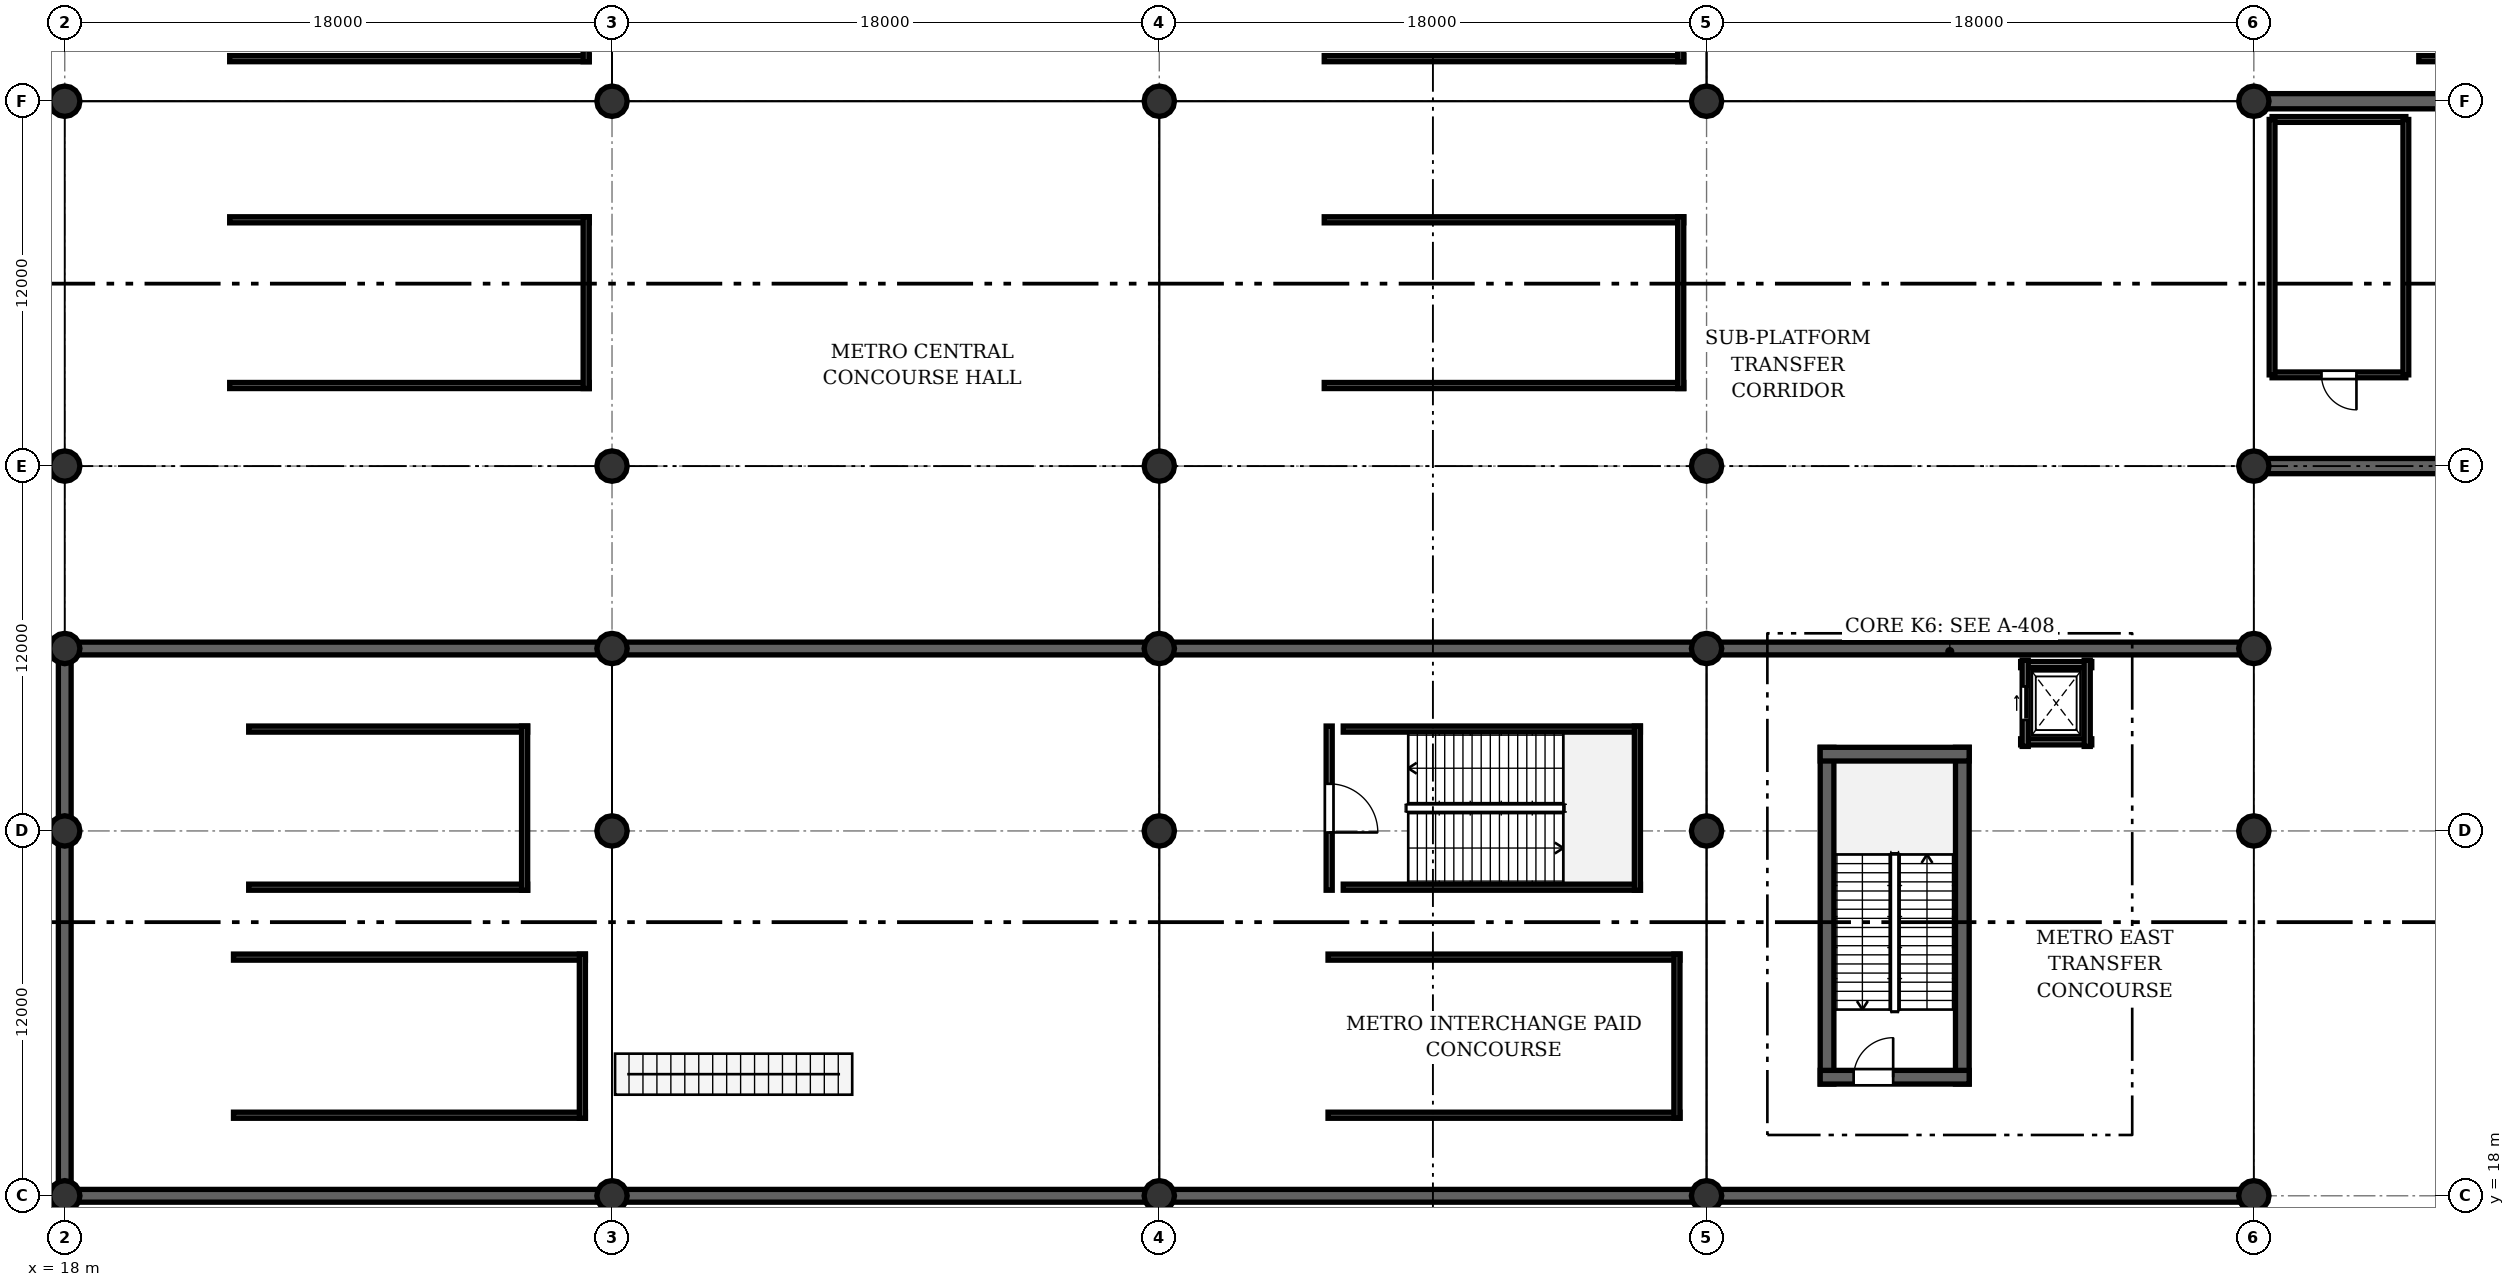
"""IFC4 building model, lengths in metres.
Left out: names, types, materials, properties, quantities, classifications, styles, units other than length and angle.
Written with IfcOpenShell. Run it as: python <this file> out.ifc"""

import sys

from ifc_helpers import new_model, si_unit, direction, frame, frame_2d, origin, origin_2d, place, context, subcontext, project, spatial, rectangle, circle, extrude, element, fill, save


model = new_model("IFC4")
c1 = context("Model", 3, precision=1e-05, world=origin(), true_north=direction((0.0, 1.0)))
c2 = subcontext(c1, "Body", "Model", "MODEL_VIEW")
j1 = project(units=[si_unit("LENGTHUNIT", "METRE"), si_unit("PLANEANGLEUNIT", "RADIAN")], contexts=[c1])
p1 = place(None, origin())
s1 = spatial("IfcSite", under=j1, at=p1, CompositionType="ELEMENT")
p2 = place(p1, origin())
s2 = spatial("IfcBuilding", under=s1, at=p2, CompositionType="ELEMENT")
p3 = place(p2, frame((0.0, 0.0, -5.4)))
s3 = spatial("IfcBuildingStorey", under=s2, at=p3, CompositionType="ELEMENT", Elevation=-5.4)
for number, where, z_axis, x_axis in (
    (1, (18.0, 18.0, 0.0), (0.0, 0.0, 1.0), (1.0, 0.0, 0.0)),
    (2, (18.0, 30.0, 0.0), (0.0, 0.0, 1.0), (1.0, 0.0, 0.0)),
    (3, (18.0, 36.0, 0.0), (0.0, 0.0, 1.0), (1.0, 0.0, 0.0)),
    (4, (18.0, 42.0, 0.0), (0.0, 0.0, 1.0), (1.0, 0.0, 0.0)),
    (5, (18.0, 54.0, 0.0), (0.0, 0.0, 1.0), (1.0, 0.0, 0.0)),
    (6, (36.0, 18.0, 0.0), (0.0, 0.0, 1.0), (1.0, 0.0, 0.0)),
    (7, (36.0, 30.0, 0.0), (0.0, 0.0, 1.0), (1.0, 0.0, 0.0)),
    (8, (36.0, 36.0, 0.0), (0.0, 0.0, 1.0), (1.0, 0.0, 0.0)),
    (9, (36.0, 42.0, 0.0), (0.0, 0.0, 1.0), (1.0, 0.0, 0.0)),
    (10, (36.0, 54.0, 0.0), (0.0, 0.0, 1.0), (1.0, 0.0, 0.0)),
    (11, (54.0, 18.0, 0.0), (0.0, 0.0, 1.0), (1.0, 0.0, 0.0)),
    (12, (54.0, 30.0, 0.0), (0.0, 0.0, 1.0), (1.0, 0.0, 0.0)),
    (13, (54.0, 36.0, 0.0), (0.0, 0.0, 1.0), (1.0, 0.0, 0.0)),
    (14, (54.0, 42.0, 0.0), (0.0, 0.0, 1.0), (1.0, 0.0, 0.0)),
    (15, (54.0, 54.0, 0.0), (0.0, 0.0, 1.0), (1.0, 0.0, 0.0)),
    (16, (72.0, 18.0, 0.0), (0.0, 0.0, 1.0), (1.0, 0.0, 0.0)),
    (17, (72.0, 30.0, 0.0), (0.0, 0.0, 1.0), (1.0, 0.0, 0.0)),
    (18, (72.0, 36.0, 0.0), (0.0, 0.0, 1.0), (1.0, 0.0, 0.0)),
    (19, (72.0, 42.0, 0.0), (0.0, 0.0, 1.0), (1.0, 0.0, 0.0)),
    (20, (72.0, 54.0, 0.0), (0.0, 0.0, 1.0), (1.0, 0.0, 0.0)),
    (21, (90.0, 18.0, 0.0), (0.0, 0.0, 1.0), (1.0, 0.0, 0.0)),
    (22, (90.0, 30.0, 0.0), (0.0, 0.0, 1.0), (1.0, 0.0, 0.0)),
    (23, (90.0, 36.0, 0.0), (0.0, 0.0, 1.0), (1.0, 0.0, 0.0)),
    (24, (90.0, 42.0, 0.0), (0.0, 0.0, 1.0), (1.0, 0.0, 0.0)),
    (25, (90.0, 54.0, 0.0), (0.0, 0.0, 1.0), (1.0, 0.0, 0.0)),
):
    element("IfcColumn", number, at=place(p3, frame(where, z_axis=z_axis, x_axis=x_axis)), inside=s3, PredefinedType="COLUMN", context=c2, shape_type="SweptSolid", body=[
        extrude(circle(Radius=0.5, at=origin_2d()), origin(), (0.0, 0.0, 1.0), 5.4),
    ])
for number, where, z_axis, x_axis in (
    (26, (90.0, 54.0, 0.0), (0.0, 0.0, 1.0), (1.0, 0.0, 0.0)),
    (27, (136.0, 42.0, 0.0), (0.0, 0.0, 1.0), (-1.0, 0.0, 0.0)),
):
    element("IfcWall", number, at=place(p3, frame(where, z_axis=z_axis, x_axis=x_axis)), inside=s3, PredefinedType="USERDEFINED", context=c2, shape_type="SweptSolid", body=[
        extrude(rectangle(XDim=46.0, YDim=0.5, at=frame_2d((23.0, 0.0))), origin(), (0.0, 0.0, 1.0), 5.05),
    ])
for number, where, z_axis, x_axis in (
    (28, (18.0, 18.0, 0.0), (0.0, 0.0, 1.0), (1.0, 0.0, 0.0)),
    (29, (90.0, 36.0, 0.0), (0.0, 0.0, 1.0), (-1.0, 0.0, 0.0)),
):
    element("IfcWall", number, at=place(p3, frame(where, z_axis=z_axis, x_axis=x_axis)), inside=s3, PredefinedType="USERDEFINED", context=c2, shape_type="SweptSolid", body=[
        extrude(rectangle(XDim=72.0, YDim=0.42, at=frame_2d((36.0, 0.0))), origin(), (0.0, 0.0, 1.0), 5.05),
    ])
p4 = place(p3, frame((18.0, 36.0, 0.0), z_axis=(0.0, 0.0, 1.0), x_axis=(0.0, -1.0, 0.0)))
e30 = element("IfcWall", 30, at=p4, inside=s3, PredefinedType="USERDEFINED", context=c2, shape_type="SweptSolid", body=[
    extrude(rectangle(XDim=18.0, YDim=0.42, at=frame_2d((9.0, 0.0))), origin(), (0.0, 0.0, 1.0), 5.05),
])
for number, where, z_axis, x_axis in (
    (31, (80.413, 21.675, 0.0), (0.0, 0.0, 1.0), (0.0, 1.0, 0.0)),
    (32, (75.962, 32.75, 0.0), (0.0, 0.0, 1.0), (0.0, -1.0, 0.0)),
):
    element("IfcWall", number, at=place(p3, frame(where, z_axis=z_axis, x_axis=x_axis)), inside=s3, PredefinedType="SHEAR", context=c2, shape_type="SweptSolid", body=[
        extrude(rectangle(XDim=11.075, YDim=0.45, at=frame_2d((5.538, 0.0))), origin(), (0.0, 0.0, 1.0), 5.05),
    ])
p5 = place(p3, frame((80.637, 32.525, 0.0), z_axis=(0.0, 0.0, 1.0), x_axis=(-1.0, 0.0, 0.0)))
e33 = element("IfcWall", 33, at=p5, inside=s3, PredefinedType="SHEAR", context=c2, shape_type="SweptSolid", body=[
    extrude(rectangle(XDim=4.9, YDim=0.45, at=frame_2d((2.45, 0.0))), origin(), (0.0, 0.0, 1.0), 5.05),
])
p6 = place(p3, frame((75.738, 21.9, 0.0), z_axis=(0.0, 0.0, 1.0), x_axis=(1.0, 0.0, 0.0)))
e34 = element("IfcWall", 34, at=p6, inside=s3, PredefinedType="SHEAR", context=c2, shape_type="SweptSolid", body=[
    extrude(rectangle(XDim=4.9, YDim=0.45, at=frame_2d((2.45, 0.0))), origin(), (0.0, 0.0, 1.0), 5.05),
])
p7 = place(p6, frame((1.1, 0.0, 0.0)))
e35 = element("IfcOpeningElement", 35, at=p7, cuts=e34, PredefinedType="OPENING", context=c2, shape_type="SweptSolid", body=[
    extrude(rectangle(XDim=1.3, YDim=2.1, at=frame_2d((0.65, 1.05))), frame((0.0, 0.235, 0.0), z_axis=(0.0, -1.0, 0.0), x_axis=(1.0, 0.0, 0.0)), (0.0, 0.0, 1.0), 0.47),
])
p8 = place(p3, frame((23.425, 55.4, 0.0), z_axis=(0.0, 0.0, 1.0), x_axis=(1.0, 0.0, 0.0)))
e36 = element("IfcWall", 36, at=p8, inside=s3, PredefinedType="SOLIDWALL", context=c2, shape_type="SweptSolid", body=[
    extrude(rectangle(XDim=11.825, YDim=0.2, at=frame_2d((5.913, 0.0))), origin(), (0.0, 0.0, 1.0), 5.02),
])
p9 = place(p3, frame((35.15, 55.3, 0.0), z_axis=(0.0, 0.0, 1.0), x_axis=(0.0, 1.0, 0.0)))
e37 = element("IfcWall", 37, at=p9, inside=s3, PredefinedType="SOLIDWALL", context=c2, shape_type="SweptSolid", body=[
    extrude(rectangle(XDim=5.65, YDim=0.2, at=frame_2d((2.825, 0.0))), origin(), (0.0, 0.0, 1.0), 5.02),
])
p10 = place(p3, frame((59.425, 55.4, 0.0), z_axis=(0.0, 0.0, 1.0), x_axis=(1.0, 0.0, 0.0)))
e38 = element("IfcWall", 38, at=p10, inside=s3, PredefinedType="SOLIDWALL", context=c2, shape_type="SweptSolid", body=[
    extrude(rectangle(XDim=11.825, YDim=0.2, at=frame_2d((5.913, 0.0))), origin(), (0.0, 0.0, 1.0), 5.02),
])
p11 = place(p3, frame((71.15, 55.3, 0.0), z_axis=(0.0, 0.0, 1.0), x_axis=(0.0, 1.0, 0.0)))
e39 = element("IfcWall", 39, at=p11, inside=s3, PredefinedType="SOLIDWALL", context=c2, shape_type="SweptSolid", body=[
    extrude(rectangle(XDim=5.65, YDim=0.2, at=frame_2d((2.825, 0.0))), origin(), (0.0, 0.0, 1.0), 5.02),
])
p12 = place(p3, frame((95.425, 55.4, 0.0), z_axis=(0.0, 0.0, 1.0), x_axis=(1.0, 0.0, 0.0)))
e40 = element("IfcWall", 40, at=p12, inside=s3, PredefinedType="SOLIDWALL", context=c2, shape_type="SweptSolid", body=[
    extrude(rectangle(XDim=11.825, YDim=0.2, at=frame_2d((5.913, 0.0))), origin(), (0.0, 0.0, 1.0), 5.02),
])
for number, where, z_axis, x_axis in (
    (41, (23.55, 20.65, 0.0), (0.0, 0.0, 1.0), (1.0, 0.0, 0.0)),
    (42, (35.125, 25.85, 0.0), (0.0, 0.0, 1.0), (-1.0, 0.0, 0.0)),
):
    element("IfcWall", number, at=place(p3, frame(where, z_axis=z_axis, x_axis=x_axis)), inside=s3, PredefinedType="SOLIDWALL", context=c2, shape_type="SweptSolid", body=[
        extrude(rectangle(XDim=11.575, YDim=0.2, at=frame_2d((5.788, 0.0))), origin(), (0.0, 0.0, 1.0), 5.05),
    ])
p13 = place(p3, frame((35.025, 20.55, 0.0), z_axis=(0.0, 0.0, 1.0), x_axis=(0.0, 1.0, 0.0)))
e43 = element("IfcWall", 43, at=p13, inside=s3, PredefinedType="SOLIDWALL", context=c2, shape_type="SweptSolid", body=[
    extrude(rectangle(XDim=5.4, YDim=0.2, at=frame_2d((2.7, 0.0))), origin(), (0.0, 0.0, 1.0), 5.05),
])
for number, where, z_axis, x_axis in (
    (44, (59.55, 20.65, 0.0), (0.0, 0.0, 1.0), (1.0, 0.0, 0.0)),
    (45, (71.125, 25.85, 0.0), (0.0, 0.0, 1.0), (-1.0, 0.0, 0.0)),
):
    element("IfcWall", number, at=place(p3, frame(where, z_axis=z_axis, x_axis=x_axis)), inside=s3, PredefinedType="SOLIDWALL", context=c2, shape_type="SweptSolid", body=[
        extrude(rectangle(XDim=11.575, YDim=0.2, at=frame_2d((5.788, 0.0))), origin(), (0.0, 0.0, 1.0), 5.05),
    ])
p14 = place(p3, frame((71.025, 20.55, 0.0), z_axis=(0.0, 0.0, 1.0), x_axis=(0.0, 1.0, 0.0)))
e46 = element("IfcWall", 46, at=p14, inside=s3, PredefinedType="SOLIDWALL", context=c2, shape_type="SweptSolid", body=[
    extrude(rectangle(XDim=5.4, YDim=0.2, at=frame_2d((2.7, 0.0))), origin(), (0.0, 0.0, 1.0), 5.05),
])
for number, where, z_axis, x_axis in (
    (47, (23.425, 44.65, 0.0), (0.0, 0.0, 1.0), (1.0, 0.0, 0.0)),
    (48, (35.25, 50.1, 0.0), (0.0, 0.0, 1.0), (-1.0, 0.0, 0.0)),
):
    element("IfcWall", number, at=place(p3, frame(where, z_axis=z_axis, x_axis=x_axis)), inside=s3, PredefinedType="SOLIDWALL", context=c2, shape_type="SweptSolid", body=[
        extrude(rectangle(XDim=11.825, YDim=0.2, at=frame_2d((5.913, 0.0))), origin(), (0.0, 0.0, 1.0), 5.05),
    ])
p15 = place(p3, frame((35.15, 44.55, 0.0), z_axis=(0.0, 0.0, 1.0), x_axis=(0.0, 1.0, 0.0)))
e49 = element("IfcWall", 49, at=p15, inside=s3, PredefinedType="SOLIDWALL", context=c2, shape_type="SweptSolid", body=[
    extrude(rectangle(XDim=5.65, YDim=0.2, at=frame_2d((2.825, 0.0))), origin(), (0.0, 0.0, 1.0), 5.05),
])
for number, where, z_axis, x_axis in (
    (50, (59.425, 44.65, 0.0), (0.0, 0.0, 1.0), (1.0, 0.0, 0.0)),
    (51, (71.25, 50.1, 0.0), (0.0, 0.0, 1.0), (-1.0, 0.0, 0.0)),
):
    element("IfcWall", number, at=place(p3, frame(where, z_axis=z_axis, x_axis=x_axis)), inside=s3, PredefinedType="SOLIDWALL", context=c2, shape_type="SweptSolid", body=[
        extrude(rectangle(XDim=11.825, YDim=0.2, at=frame_2d((5.913, 0.0))), origin(), (0.0, 0.0, 1.0), 5.05),
    ])
p16 = place(p3, frame((71.15, 44.55, 0.0), z_axis=(0.0, 0.0, 1.0), x_axis=(0.0, 1.0, 0.0)))
e52 = element("IfcWall", 52, at=p16, inside=s3, PredefinedType="SOLIDWALL", context=c2, shape_type="SweptSolid", body=[
    extrude(rectangle(XDim=5.65, YDim=0.2, at=frame_2d((2.825, 0.0))), origin(), (0.0, 0.0, 1.0), 5.05),
])
for number, where, z_axis, x_axis in (
    (53, (24.05, 28.15, 0.0), (0.0, 0.0, 1.0), (1.0, 0.0, 0.0)),
    (54, (33.225, 33.35, 0.0), (0.0, 0.0, 1.0), (-1.0, 0.0, 0.0)),
):
    element("IfcWall", number, at=place(p3, frame(where, z_axis=z_axis, x_axis=x_axis)), inside=s3, PredefinedType="SOLIDWALL", context=c2, shape_type="SweptSolid", body=[
        extrude(rectangle(XDim=9.175, YDim=0.2, at=frame_2d((4.587, 0.0))), origin(), (0.0, 0.0, 1.0), 5.05),
    ])
p17 = place(p3, frame((33.125, 28.05, 0.0), z_axis=(0.0, 0.0, 1.0), x_axis=(0.0, 1.0, 0.0)))
e55 = element("IfcWall", 55, at=p17, inside=s3, PredefinedType="SOLIDWALL", context=c2, shape_type="SweptSolid", body=[
    extrude(rectangle(XDim=5.4, YDim=0.2, at=frame_2d((2.7, 0.0))), origin(), (0.0, 0.0, 1.0), 5.05),
])
for number, where, z_axis, x_axis in (
    (56, (60.05, 28.15, 0.0), (0.0, 0.0, 1.0), (1.0, 0.0, 0.0)),
    (57, (69.825, 33.35, 0.0), (0.0, 0.0, 1.0), (-1.0, 0.0, 0.0)),
):
    element("IfcWall", number, at=place(p3, frame(where, z_axis=z_axis, x_axis=x_axis)), inside=s3, PredefinedType="SOLIDWALL", context=c2, shape_type="SweptSolid", body=[
        extrude(rectangle(XDim=9.775, YDim=0.2, at=frame_2d((4.887, 0.0))), origin(), (0.0, 0.0, 1.0), 5.05),
    ])
p18 = place(p3, frame((69.725, 28.05, 0.0), z_axis=(0.0, 0.0, 1.0), x_axis=(0.0, 1.0, 0.0)))
e58 = element("IfcWall", 58, at=p18, inside=s3, PredefinedType="SOLIDWALL", context=c2, shape_type="SweptSolid", body=[
    extrude(rectangle(XDim=5.4, YDim=0.2, at=frame_2d((2.7, 0.0))), origin(), (0.0, 0.0, 1.0), 5.05),
])
p19 = place(p3, frame((59.587, 33.45, 0.0), z_axis=(0.0, 0.0, 1.0), x_axis=(0.0, -1.0, 0.0)))
e59 = element("IfcWall", 59, at=p19, inside=s3, PredefinedType="SOLIDWALL", context=c2, shape_type="SweptSolid", body=[
    extrude(rectangle(XDim=5.4, YDim=0.2, at=frame_2d((2.7, 0.0))), origin(), (0.0, 0.0, 1.0), 4.4),
])
p20 = place(p19, frame((1.9, 0.0, 0.0)))
e60 = element("IfcOpeningElement", 60, at=p20, cuts=e59, PredefinedType="OPENING", context=c2, shape_type="SweptSolid", body=[
    extrude(rectangle(XDim=1.6, YDim=2.15, at=frame_2d((0.8, 1.075))), frame((0.0, 0.11, 0.0), z_axis=(0.0, -1.0, 0.0), x_axis=(1.0, 0.0, 0.0)), (0.0, 0.0, 1.0), 0.22),
])
p21 = place(p3, frame((82.33, 32.93, 0.0), z_axis=(0.0, 0.0, 1.0), x_axis=(1.0, 0.0, 0.0)))
e61 = element("IfcWall", 61, at=p21, inside=s3, PredefinedType="SOLIDWALL", context=c2, shape_type="SweptSolid", body=[
    extrude(rectangle(XDim=2.34, YDim=0.2, at=frame_2d((1.17, 0.0))), origin(), (0.0, 0.0, 1.0), 4.4),
])
p22 = place(p3, frame((84.67, 35.47, 0.0), z_axis=(0.0, 0.0, 1.0), x_axis=(-1.0, 0.0, 0.0)))
e62 = element("IfcWall", 62, at=p22, inside=s3, PredefinedType="SOLIDWALL", context=c2, shape_type="SweptSolid", body=[
    extrude(rectangle(XDim=2.34, YDim=0.2, at=frame_2d((1.17, 0.0))), origin(), (0.0, 0.0, 1.0), 4.325),
])
p23 = place(p3, frame((82.48, 35.62, 0.0), z_axis=(0.0, 0.0, 1.0), x_axis=(0.0, -1.0, 0.0)))
e63 = element("IfcWall", 63, at=p23, inside=s3, PredefinedType="SOLIDWALL", context=c2, shape_type="SweptSolid", body=[
    extrude(rectangle(XDim=2.84, YDim=0.2, at=frame_2d((1.42, 0.0))), origin(), (0.0, 0.0, 1.0), 4.325),
])
p24 = place(p23, frame((0.87, 0.0, 0.0)))
e64 = element("IfcOpeningElement", 64, at=p24, cuts=e63, PredefinedType="OPENING", context=c2, shape_type="SweptSolid", body=[
    extrude(rectangle(XDim=1.1, YDim=2.15, at=frame_2d((0.55, 1.075))), frame((0.0, 0.11, 0.0), z_axis=(0.0, -1.0, 0.0), x_axis=(1.0, 0.0, 0.0)), (0.0, 0.0, 1.0), 0.22),
])
p25 = place(p3, frame((84.52, 32.78, 0.0), z_axis=(0.0, 0.0, 1.0), x_axis=(0.0, 1.0, 0.0)))
e65 = element("IfcWall", 65, at=p25, inside=s3, PredefinedType="SOLIDWALL", context=c2, shape_type="SweptSolid", body=[
    extrude(rectangle(XDim=2.84, YDim=0.2, at=frame_2d((1.42, 0.0))), origin(), (0.0, 0.0, 1.0), 4.325),
])
p26 = place(p3, frame((95.0, 45.0, 0.0), z_axis=(0.0, 0.0, 1.0), x_axis=(-1.0, 0.0, 0.0)))
e66 = element("IfcWall", 66, at=p26, inside=s3, PredefinedType="PARTITIONING", context=c2, shape_type="SweptSolid", body=[
    extrude(rectangle(XDim=4.4, YDim=0.19, at=frame_2d((2.2, 0.0))), origin(), (0.0, 0.0, 1.0), 4.4),
])
p27 = place(p26, frame((1.625, 0.0, 0.0)))
e67 = element("IfcOpeningElement", 67, at=p27, cuts=e66, PredefinedType="OPENING", context=c2, shape_type="SweptSolid", body=[
    extrude(rectangle(XDim=1.15, YDim=2.1, at=frame_2d((0.575, 1.05))), frame((0.0, 0.105, 0.0), z_axis=(0.0, -1.0, 0.0), x_axis=(1.0, 0.0, 0.0)), (0.0, 0.0, 1.0), 0.21),
])
p28 = place(p3, frame((90.6, 53.4, 0.0), z_axis=(0.0, 0.0, 1.0), x_axis=(1.0, 0.0, 0.0)))
e68 = element("IfcWall", 68, at=p28, inside=s3, PredefinedType="PARTITIONING", context=c2, shape_type="SweptSolid", body=[
    extrude(rectangle(XDim=4.4, YDim=0.19, at=frame_2d((2.2, 0.0))), origin(), (0.0, 0.0, 1.0), 4.295),
])
for number, where, z_axis, x_axis in (
    (69, (90.6, 45.0, 0.0), (0.0, 0.0, 1.0), (0.0, 1.0, 0.0)),
    (70, (95.0, 53.4, 0.0), (0.0, 0.0, 1.0), (0.0, -1.0, 0.0)),
):
    element("IfcWall", number, at=place(p3, frame(where, z_axis=z_axis, x_axis=x_axis)), inside=s3, PredefinedType="PARTITIONING", context=c2, shape_type="SweptSolid", body=[
        extrude(rectangle(XDim=8.4, YDim=0.19, at=frame_2d((4.2, 0.0))), origin(), (0.0, 0.0, 1.0), 4.295),
    ])
p29 = place(p7, origin())
e71 = element("IfcDoor", 71, at=p29, inside=s3, OperationType="SINGLE_SWING_RIGHT", PredefinedType="DOOR", context=c2, shape_type="SweptSolid", body=[
    extrude(rectangle(XDim=1.3, YDim=2.1, at=frame_2d((0.65, 1.05))), frame((0.0, 0.025, 0.0), z_axis=(0.0, -1.0, 0.0), x_axis=(1.0, 0.0, 0.0)), (0.0, 0.0, 1.0), 0.05),
])
fill(e35, e71)
p30 = place(p20, origin())
e72 = element("IfcDoor", 72, at=p30, inside=s3, OperationType="SINGLE_SWING_RIGHT", PredefinedType="DOOR", context=c2, shape_type="SweptSolid", body=[
    extrude(rectangle(XDim=1.6, YDim=2.15, at=frame_2d((0.8, 1.075))), frame((0.0, 0.025, 0.0), z_axis=(0.0, -1.0, 0.0), x_axis=(1.0, 0.0, 0.0)), (0.0, 0.0, 1.0), 0.05),
])
fill(e60, e72)
p31 = place(p24, origin())
e73 = element("IfcDoor", 73, at=p31, inside=s3, OperationType="SLIDING_TO_LEFT", PredefinedType="DOOR", context=c2, shape_type="SweptSolid", body=[
    extrude(rectangle(XDim=1.1, YDim=2.15, at=frame_2d((0.55, 1.075))), frame((0.0, 0.025, 0.0), z_axis=(0.0, -1.0, 0.0), x_axis=(1.0, 0.0, 0.0)), (0.0, 0.0, 1.0), 0.05),
])
fill(e64, e73)
p32 = place(p27, origin())
e74 = element("IfcDoor", 74, at=p32, inside=s3, OperationType="SINGLE_SWING_LEFT", PredefinedType="DOOR", context=c2, shape_type="SweptSolid", body=[
    extrude(rectangle(XDim=1.15, YDim=2.1, at=frame_2d((0.575, 1.05))), frame((0.0, 0.025, 0.0), z_axis=(0.0, -1.0, 0.0), x_axis=(1.0, 0.0, 0.0)), (0.0, 0.0, 1.0), 0.05),
])
fill(e67, e74)
save(model, sys.argv[1])
